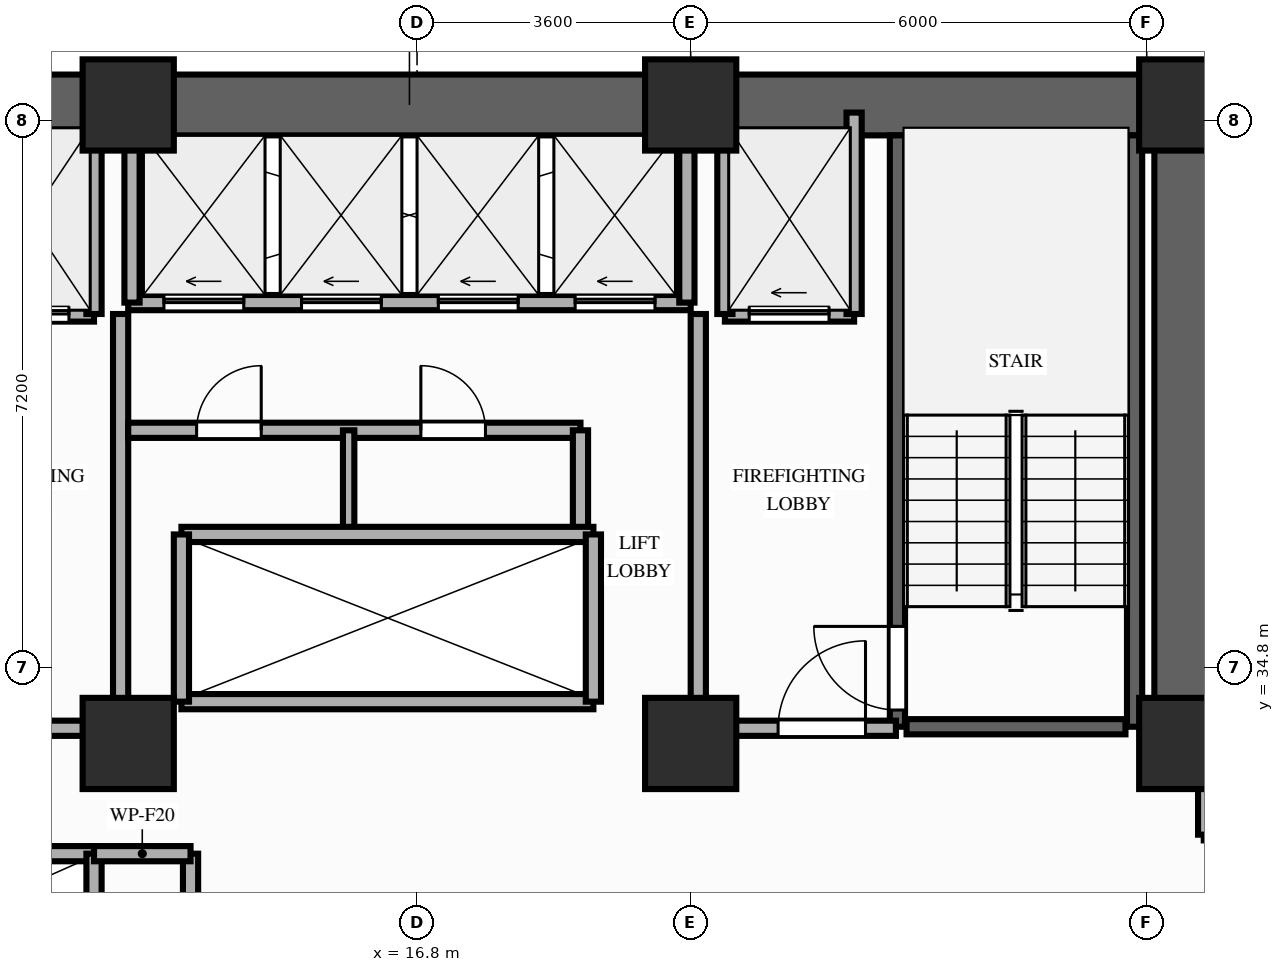
"""IFC4 building model, lengths in metres.
Left out: names, types, materials, properties, quantities, classifications, styles, units other than length and angle.
Written with IfcOpenShell. Run it as: python <this file> out.ifc"""

import sys

from ifc_helpers import new_model, si_unit, direction, frame, frame_2d, origin, origin_2d, place, context, subcontext, project, spatial, rectangle, extrude, element, fill, save


model = new_model("IFC4")
c1 = context("Model", 3, precision=1e-05, world=origin(), true_north=direction((0.0, 1.0)))
c2 = subcontext(c1, "Body", "Model", "MODEL_VIEW")
j1 = project(units=[si_unit("LENGTHUNIT", "METRE"), si_unit("PLANEANGLEUNIT", "RADIAN")], contexts=[c1])
p1 = place(None, origin())
s1 = spatial("IfcSite", under=j1, at=p1, CompositionType="ELEMENT")
p2 = place(p1, origin())
s2 = spatial("IfcBuilding", under=s1, at=p2, CompositionType="ELEMENT")
p3 = place(p2, frame((0.0, 0.0, 53.2)))
s3 = spatial("IfcBuildingStorey", under=s2, at=p3, CompositionType="ELEMENT", Elevation=53.2)
for number, where, z_axis, x_axis in (
    (1, (13.0, 33.8, 0.0), (0.0, 0.0, 1.0), (1.0, 0.0, 0.0)),
    (2, (20.4, 33.8, 0.0), (0.0, 0.0, 1.0), (1.0, 0.0, 0.0)),
    (3, (26.9, 33.8, 0.0), (0.0, 0.0, 1.0), (1.0, 0.0, 0.0)),
    (4, (13.0, 42.2, 0.0), (0.0, 0.0, 1.0), (1.0, 0.0, 0.0)),
    (5, (20.4, 42.2, 0.0), (0.0, 0.0, 1.0), (1.0, 0.0, 0.0)),
    (6, (26.9, 42.2, 0.0), (0.0, 0.0, 1.0), (1.0, 0.0, 0.0)),
):
    element("IfcColumn", number, at=place(p3, frame(where, z_axis=z_axis, x_axis=x_axis)), inside=s3, PredefinedType="COLUMN", context=c2, shape_type="SweptSolid", body=[
        extrude(rectangle(XDim=1.2, YDim=1.2, at=origin_2d()), origin(), (0.0, 0.0, 1.0), 3.2),
    ])
p4 = place(p3, frame((6.45, 42.2, 0.0), z_axis=(0.0, 0.0, 1.0), x_axis=(1.0, 0.0, 0.0)))
e7 = element("IfcWall", 7, at=p4, inside=s3, PredefinedType="SHEAR", context=c2, shape_type="SweptSolid", body=[
    extrude(rectangle(XDim=20.45, YDim=0.8, at=frame_2d((10.225, 0.0))), origin(), (0.0, 0.0, 1.0), 3.02),
])
p5 = place(p3, frame((26.9, 33.8, 0.0), z_axis=(0.0, 0.0, 1.0), x_axis=(0.0, 1.0, 0.0)))
e8 = element("IfcWall", 8, at=p5, inside=s3, PredefinedType="SHEAR", context=c2, shape_type="SweptSolid", body=[
    extrude(rectangle(XDim=7.95, YDim=0.8, at=frame_2d((3.975, 0.0))), origin(), (0.0, 0.0, 1.0), 3.02),
])
p6 = place(p3, frame((23.12, 34.02, 0.0), z_axis=(0.0, 0.0, 1.0), x_axis=(0.0, 1.0, 0.0)))
e9 = element("IfcWall", 9, at=p6, inside=s3, PredefinedType="SHEAR", context=c2, shape_type="SweptSolid", body=[
    extrude(rectangle(XDim=7.78, YDim=0.2, at=frame_2d((3.89, 0.0))), origin(), (0.0, 0.0, 1.0), 3.02),
])
p7 = place(p6, frame((0.22, 0.0, 0.0)))
e10 = element("IfcOpeningElement", 10, at=p7, cuts=e9, PredefinedType="OPENING", context=c2, shape_type="SweptSolid", body=[
    extrude(rectangle(XDim=1.1, YDim=2.15, at=frame_2d((0.55, 1.075))), frame((0.0, 0.11, 0.0), z_axis=(0.0, -1.0, 0.0), x_axis=(1.0, 0.0, 0.0)), (0.0, 0.0, 1.0), 0.22),
])
p8 = place(p3, frame((26.24, 34.02, 0.0), z_axis=(0.0, 0.0, 1.0), x_axis=(0.0, 1.0, 0.0)))
e11 = element("IfcWall", 11, at=p8, inside=s3, PredefinedType="SHEAR", context=c2, shape_type="SweptSolid", body=[
    extrude(rectangle(XDim=7.78, YDim=0.2, at=frame_2d((3.89, 0.0))), origin(), (0.0, 0.0, 1.0), 3.02),
])
p9 = place(p3, frame((23.24, 34.02, 0.0), z_axis=(0.0, 0.0, 1.0), x_axis=(1.0, 0.0, 0.0)))
e12 = element("IfcWall", 12, at=p9, inside=s3, PredefinedType="SHEAR", context=c2, shape_type="SweptSolid", body=[
    extrude(rectangle(XDim=2.88, YDim=0.2, at=frame_2d((1.44, 0.0))), origin(), (0.0, 0.0, 1.0), 3.02),
])
p10 = place(p3, frame((7.0, 32.35, 0.0), z_axis=(0.0, 0.0, 1.0), x_axis=(1.0, 0.0, 0.0)))
e13 = element("IfcWall", 13, at=p10, inside=s3, PredefinedType="MOVABLE", context=c2, shape_type="SweptSolid", body=[
    extrude(rectangle(XDim=5.55, YDim=0.2, at=frame_2d((2.775, 0.0))), origin(), (0.0, 0.0, 1.0), 3.02),
])
p11 = place(p3, frame((12.55, 29.85, 0.0), z_axis=(0.0, 0.0, 1.0), x_axis=(0.0, 1.0, 0.0)))
e14 = element("IfcWall", 14, at=p11, inside=s3, PredefinedType="MOVABLE", context=c2, shape_type="SweptSolid", body=[
    extrude(rectangle(XDim=2.5, YDim=0.2, at=frame_2d((1.25, 0.0))), origin(), (0.0, 0.0, 1.0), 3.02),
])
p12 = place(p3, frame((10.85, 39.45, 0.0), z_axis=(0.0, 0.0, 1.0), x_axis=(1.0, 0.0, 0.0)))
e15 = element("IfcWall", 15, at=p12, inside=s3, PredefinedType="MOVABLE", context=c2, shape_type="SweptSolid", body=[
    extrude(rectangle(XDim=1.7, YDim=0.2, at=frame_2d((0.85, 0.0))), origin(), (0.0, 0.0, 1.0), 3.02),
])
p13 = place(p12, frame((0.32, 0.0, 0.0)))
e16 = element("IfcOpeningElement", 16, at=p13, cuts=e15, PredefinedType="OPENING", context=c2, shape_type="SweptSolid", body=[
    extrude(rectangle(XDim=1.05, YDim=2.15, at=frame_2d((0.525, 1.075))), frame((0.0, 0.11, 0.0), z_axis=(0.0, -1.0, 0.0), x_axis=(1.0, 0.0, 0.0)), (0.0, 0.0, 1.0), 0.22),
])
p14 = place(p3, frame((20.85, 39.45, 0.0), z_axis=(0.0, 0.0, 1.0), x_axis=(1.0, 0.0, 0.0)))
e17 = element("IfcWall", 17, at=p14, inside=s3, PredefinedType="MOVABLE", context=c2, shape_type="SweptSolid", body=[
    extrude(rectangle(XDim=1.7, YDim=0.2, at=frame_2d((0.85, 0.0))), origin(), (0.0, 0.0, 1.0), 3.02),
])
p15 = place(p14, frame((0.32, 0.0, 0.0)))
e18 = element("IfcOpeningElement", 18, at=p15, cuts=e17, PredefinedType="OPENING", context=c2, shape_type="SweptSolid", body=[
    extrude(rectangle(XDim=1.05, YDim=2.15, at=frame_2d((0.525, 1.075))), frame((0.0, 0.11, 0.0), z_axis=(0.0, -1.0, 0.0), x_axis=(1.0, 0.0, 0.0)), (0.0, 0.0, 1.0), 0.22),
])
p16 = place(p3, frame((12.55, 39.45, 0.0), z_axis=(0.0, 0.0, 1.0), x_axis=(0.0, 1.0, 0.0)))
e19 = element("IfcWall", 19, at=p16, inside=s3, PredefinedType="MOVABLE", context=c2, shape_type="SweptSolid", body=[
    extrude(rectangle(XDim=2.65, YDim=0.2, at=frame_2d((1.325, 0.0))), origin(), (0.0, 0.0, 1.0), 2.41),
])
p17 = place(p3, frame((12.9, 34.0, 0.0), z_axis=(0.0, 0.0, 1.0), x_axis=(0.0, 1.0, 0.0)))
e20 = element("IfcWall", 20, at=p17, inside=s3, PredefinedType="PARTITIONING", context=c2, shape_type="SweptSolid", body=[
    extrude(rectangle(XDim=5.45, YDim=0.2, at=frame_2d((2.725, 0.0))), origin(), (0.0, 0.0, 1.0), 2.41),
])
p18 = place(p3, frame((10.24, 34.0, 0.0), z_axis=(0.0, 0.0, 1.0), x_axis=(1.0, 0.0, 0.0)))
e21 = element("IfcWall", 21, at=p18, inside=s3, PredefinedType="PARTITIONING", context=c2, shape_type="SweptSolid", body=[
    extrude(rectangle(XDim=2.66, YDim=0.2, at=frame_2d((1.33, 0.0))), origin(), (0.0, 0.0, 1.0), 2.41),
])
p19 = place(p18, frame((0.35, 0.0, 0.0)))
e22 = element("IfcOpeningElement", 22, at=p19, cuts=e21, PredefinedType="OPENING", context=c2, shape_type="SweptSolid", body=[
    extrude(rectangle(XDim=1.15, YDim=2.15, at=frame_2d((0.575, 1.075))), frame((0.0, 0.11, 0.0), z_axis=(0.0, -1.0, 0.0), x_axis=(1.0, 0.0, 0.0)), (0.0, 0.0, 1.0), 0.22),
])
for number, where, z_axis, x_axis in (
    (23, (20.85, 39.45, 0.0), (0.0, 0.0, 1.0), (0.0, 1.0, 0.0)),
    (24, (22.55, 39.45, 0.0), (0.0, 0.0, 1.0), (0.0, 1.0, 0.0)),
):
    element("IfcWall", number, at=place(p3, frame(where, z_axis=z_axis, x_axis=x_axis)), inside=s3, PredefinedType="MOVABLE", context=c2, shape_type="SweptSolid", body=[
        extrude(rectangle(XDim=2.65, YDim=0.2, at=frame_2d((1.325, 0.0))), origin(), (0.0, 0.0, 1.0), 2.41),
    ])
p20 = place(p3, frame((20.5, 34.0, 0.0), z_axis=(0.0, 0.0, 1.0), x_axis=(0.0, 1.0, 0.0)))
e25 = element("IfcWall", 25, at=p20, inside=s3, PredefinedType="PARTITIONING", context=c2, shape_type="SweptSolid", body=[
    extrude(rectangle(XDim=5.45, YDim=0.2, at=frame_2d((2.725, 0.0))), origin(), (0.0, 0.0, 1.0), 2.41),
])
p21 = place(p3, frame((20.5, 34.0, 0.0), z_axis=(0.0, 0.0, 1.0), x_axis=(1.0, 0.0, 0.0)))
e26 = element("IfcWall", 26, at=p21, inside=s3, PredefinedType="PARTITIONING", context=c2, shape_type="SweptSolid", body=[
    extrude(rectangle(XDim=2.6, YDim=0.2, at=frame_2d((1.3, 0.0))), origin(), (0.0, 0.0, 1.0), 2.41),
])
p22 = place(p21, frame((1.05, 0.0, 0.0)))
e27 = element("IfcOpeningElement", 27, at=p22, cuts=e26, PredefinedType="OPENING", context=c2, shape_type="SweptSolid", body=[
    extrude(rectangle(XDim=1.15, YDim=2.15, at=frame_2d((0.575, 1.075))), frame((0.0, 0.11, 0.0), z_axis=(0.0, -1.0, 0.0), x_axis=(1.0, 0.0, 0.0)), (0.0, 0.0, 1.0), 0.22),
])
p23 = place(p3, frame((13.82, 29.85, 0.0), z_axis=(0.0, 0.0, 1.0), x_axis=(0.0, 1.0, 0.0)))
e28 = element("IfcWall", 28, at=p23, inside=s3, PredefinedType="PARTITIONING", context=c2, shape_type="SweptSolid", body=[
    extrude(rectangle(XDim=2.5, YDim=0.2, at=frame_2d((1.25, 0.0))), origin(), (0.0, 0.0, 1.0), 3.02),
])
p24 = place(p3, frame((12.55, 32.35, 0.0), z_axis=(0.0, 0.0, 1.0), x_axis=(1.0, 0.0, 0.0)))
e29 = element("IfcWall", 29, at=p24, inside=s3, PredefinedType="PARTITIONING", context=c2, shape_type="SweptSolid", body=[
    extrude(rectangle(XDim=1.27, YDim=0.2, at=frame_2d((0.635, 0.0))), origin(), (0.0, 0.0, 1.0), 3.02),
])
p25 = place(p3, frame((13.0, 39.6, 0.0), z_axis=(0.0, 0.0, 1.0), x_axis=(1.0, 0.0, 0.0)))
e30 = element("IfcWall", 30, at=p25, inside=s3, PredefinedType="MOVABLE", context=c2, shape_type="SweptSolid", body=[
    extrude(rectangle(XDim=7.4, YDim=0.2, at=frame_2d((3.7, 0.0))), origin(), (0.0, 0.0, 1.0), 3.02),
])
p26 = place(p25, frame((0.47, 0.0, 0.0)))
e31 = element("IfcOpeningElement", 31, at=p26, cuts=e30, PredefinedType="OPENING", context=c2, shape_type="SweptSolid", body=[
    extrude(rectangle(XDim=1.05, YDim=2.15, at=frame_2d((0.525, 1.075))), frame((0.0, 0.11, 0.0), z_axis=(0.0, -1.0, 0.0), x_axis=(1.0, 0.0, 0.0)), (0.0, 0.0, 1.0), 0.22),
])
p27 = place(p25, frame((2.28, 0.0, 0.0)))
e32 = element("IfcOpeningElement", 32, at=p27, cuts=e30, PredefinedType="OPENING", context=c2, shape_type="SweptSolid", body=[
    extrude(rectangle(XDim=1.05, YDim=2.15, at=frame_2d((0.525, 1.075))), frame((0.0, 0.11, 0.0), z_axis=(0.0, -1.0, 0.0), x_axis=(1.0, 0.0, 0.0)), (0.0, 0.0, 1.0), 0.22),
])
p28 = place(p25, frame((4.08, 0.0, 0.0)))
e33 = element("IfcOpeningElement", 33, at=p28, cuts=e30, PredefinedType="OPENING", context=c2, shape_type="SweptSolid", body=[
    extrude(rectangle(XDim=1.05, YDim=2.15, at=frame_2d((0.525, 1.075))), frame((0.0, 0.11, 0.0), z_axis=(0.0, -1.0, 0.0), x_axis=(1.0, 0.0, 0.0)), (0.0, 0.0, 1.0), 0.22),
])
p29 = place(p25, frame((5.88, 0.0, 0.0)))
e34 = element("IfcOpeningElement", 34, at=p29, cuts=e30, PredefinedType="OPENING", context=c2, shape_type="SweptSolid", body=[
    extrude(rectangle(XDim=1.05, YDim=2.15, at=frame_2d((0.525, 1.075))), frame((0.0, 0.11, 0.0), z_axis=(0.0, -1.0, 0.0), x_axis=(1.0, 0.0, 0.0)), (0.0, 0.0, 1.0), 0.22),
])
for number, where, z_axis, x_axis in (
    (35, (13.05, 39.6, 0.0), (0.0, 0.0, 1.0), (0.0, 1.0, 0.0)),
    (36, (20.35, 39.6, 0.0), (0.0, 0.0, 1.0), (0.0, 1.0, 0.0)),
):
    element("IfcWall", number, at=place(p3, frame(where, z_axis=z_axis, x_axis=x_axis)), inside=s3, PredefinedType="MOVABLE", context=c2, shape_type="SweptSolid", body=[
        extrude(rectangle(XDim=2.18, YDim=0.2, at=frame_2d((1.09, 0.0))), origin(), (0.0, 0.0, 1.0), 3.02),
    ])
p30 = place(p3, frame((13.0, 37.92, 0.0), z_axis=(0.0, 0.0, 1.0), x_axis=(1.0, 0.0, 0.0)))
e37 = element("IfcWall", 37, at=p30, inside=s3, PredefinedType="PARTITIONING", context=c2, shape_type="SweptSolid", body=[
    extrude(rectangle(XDim=5.95, YDim=0.2, at=frame_2d((2.975, 0.0))), origin(), (0.0, 0.0, 1.0), 3.02),
])
p31 = place(p30, frame((0.9, 0.0, 0.0)))
e38 = element("IfcOpeningElement", 38, at=p31, cuts=e37, PredefinedType="OPENING", context=c2, shape_type="SweptSolid", body=[
    extrude(rectangle(XDim=0.85, YDim=2.05, at=frame_2d((0.425, 1.025))), frame((0.0, 0.11, 0.0), z_axis=(0.0, -1.0, 0.0), x_axis=(1.0, 0.0, 0.0)), (0.0, 0.0, 1.0), 0.22),
])
p32 = place(p30, frame((3.85, 0.0, 0.0)))
e39 = element("IfcOpeningElement", 39, at=p32, cuts=e37, PredefinedType="OPENING", context=c2, shape_type="SweptSolid", body=[
    extrude(rectangle(XDim=0.85, YDim=2.05, at=frame_2d((0.425, 1.025))), frame((0.0, 0.11, 0.0), z_axis=(0.0, -1.0, 0.0), x_axis=(1.0, 0.0, 0.0)), (0.0, 0.0, 1.0), 0.22),
])
p33 = place(p3, frame((18.95, 36.6, 0.0), z_axis=(0.0, 0.0, 1.0), x_axis=(0.0, 1.0, 0.0)))
e40 = element("IfcWall", 40, at=p33, inside=s3, PredefinedType="PARTITIONING", context=c2, shape_type="SweptSolid", body=[
    extrude(rectangle(XDim=1.32, YDim=0.2, at=frame_2d((0.66, 0.0))), origin(), (0.0, 0.0, 1.0), 3.02),
])
p34 = place(p3, frame((15.9, 36.6, 0.0), z_axis=(0.0, 0.0, 1.0), x_axis=(0.0, 1.0, 0.0)))
e41 = element("IfcWall", 41, at=p34, inside=s3, PredefinedType="PARTITIONING", context=c2, shape_type="SweptSolid", body=[
    extrude(rectangle(XDim=1.32, YDim=0.15, at=frame_2d((0.66, 0.0))), origin(), (0.0, 0.0, 1.0), 3.02),
])
for number, where, z_axis, x_axis in (
    (42, (13.7, 34.35, 0.0), (0.0, 0.0, 1.0), (1.0, 0.0, 0.0)),
    (43, (13.7, 36.55, 0.0), (0.0, 0.0, 1.0), (1.0, 0.0, 0.0)),
):
    element("IfcWall", number, at=place(p3, frame(where, z_axis=z_axis, x_axis=x_axis)), inside=s3, PredefinedType="MOVABLE", context=c2, shape_type="SweptSolid", body=[
        extrude(rectangle(XDim=5.42, YDim=0.2, at=frame_2d((2.71, 0.0))), origin(), (0.0, 0.0, 1.0), 3.02),
    ])
for number, where, z_axis, x_axis in (
    (44, (13.7, 34.35, 0.0), (0.0, 0.0, 1.0), (0.0, 1.0, 0.0)),
    (45, (19.12, 34.35, 0.0), (0.0, 0.0, 1.0), (0.0, 1.0, 0.0)),
):
    element("IfcWall", number, at=place(p3, frame(where, z_axis=z_axis, x_axis=x_axis)), inside=s3, PredefinedType="MOVABLE", context=c2, shape_type="SweptSolid", body=[
        extrude(rectangle(XDim=2.2, YDim=0.2, at=frame_2d((1.1, 0.0))), origin(), (0.0, 0.0, 1.0), 3.02),
    ])
p35 = place(p3, frame((27.15, 32.6, 0.0), z_axis=(0.0, 0.0, 1.0), x_axis=(1.0, 0.0, 0.0)))
e46 = element("IfcWall", 46, at=p35, inside=s3, PredefinedType="PARTITIONING", context=c2, shape_type="SweptSolid", body=[
    extrude(rectangle(XDim=11.15, YDim=0.15, at=frame_2d((5.575, 0.0))), origin(), (0.0, 0.0, 1.0), 2.41),
])
p36 = place(p35, frame((1.59, 0.0, 0.0)))
e47 = element("IfcOpeningElement", 47, at=p36, cuts=e46, PredefinedType="OPENING", context=c2, shape_type="SweptSolid", body=[
    extrude(rectangle(XDim=0.95, YDim=2.15, at=frame_2d((0.475, 1.075))), frame((0.0, 0.085, 0.0), z_axis=(0.0, -1.0, 0.0), x_axis=(1.0, 0.0, 0.0)), (0.0, 0.0, 1.0), 0.17),
])
p37 = place(p35, frame((7.16, 0.0, 0.0)))
e48 = element("IfcOpeningElement", 48, at=p37, cuts=e46, PredefinedType="OPENING", context=c2, shape_type="SweptSolid", body=[
    extrude(rectangle(XDim=0.95, YDim=2.15, at=frame_2d((0.475, 1.075))), frame((0.0, 0.085, 0.0), z_axis=(0.0, -1.0, 0.0), x_axis=(1.0, 0.0, 0.0)), (0.0, 0.0, 1.0), 0.17),
])
p38 = place(p3, frame((27.15, 32.6, 0.0), z_axis=(0.0, 0.0, 1.0), x_axis=(0.0, 1.0, 0.0)))
e49 = element("IfcWall", 49, at=p38, inside=s3, PredefinedType="PARTITIONING", context=c2, shape_type="SweptSolid", body=[
    extrude(rectangle(XDim=1.08, YDim=0.15, at=frame_2d((0.54, 0.0))), origin(), (0.0, 0.0, 1.0), 2.41),
])
p39 = place(p7, origin())
e50 = element("IfcDoor", 50, at=p39, inside=s3, OperationType="SINGLE_SWING_RIGHT", PredefinedType="DOOR", context=c2, shape_type="SweptSolid", body=[
    extrude(rectangle(XDim=1.1, YDim=2.15, at=frame_2d((0.55, 1.075))), frame((0.0, 0.025, 0.0), z_axis=(0.0, -1.0, 0.0), x_axis=(1.0, 0.0, 0.0)), (0.0, 0.0, 1.0), 0.05),
])
fill(e10, e50)
p40 = place(p13, origin())
e51 = element("IfcDoor", 51, at=p40, inside=s3, OperationType="SLIDING_TO_LEFT", PredefinedType="DOOR", context=c2, shape_type="SweptSolid", body=[
    extrude(rectangle(XDim=1.05, YDim=2.15, at=frame_2d((0.525, 1.075))), frame((0.0, 0.025, 0.0), z_axis=(0.0, -1.0, 0.0), x_axis=(1.0, 0.0, 0.0)), (0.0, 0.0, 1.0), 0.05),
])
fill(e16, e51)
p41 = place(p15, origin())
e52 = element("IfcDoor", 52, at=p41, inside=s3, OperationType="SLIDING_TO_LEFT", PredefinedType="DOOR", context=c2, shape_type="SweptSolid", body=[
    extrude(rectangle(XDim=1.05, YDim=2.15, at=frame_2d((0.525, 1.075))), frame((0.0, 0.025, 0.0), z_axis=(0.0, -1.0, 0.0), x_axis=(1.0, 0.0, 0.0)), (0.0, 0.0, 1.0), 0.05),
])
fill(e18, e52)
p42 = place(p22, origin())
e53 = element("IfcDoor", 53, at=p42, inside=s3, OperationType="SINGLE_SWING_RIGHT", PredefinedType="DOOR", context=c2, shape_type="SweptSolid", body=[
    extrude(rectangle(XDim=1.15, YDim=2.15, at=frame_2d((0.575, 1.075))), frame((0.0, 0.025, 0.0), z_axis=(0.0, -1.0, 0.0), x_axis=(1.0, 0.0, 0.0)), (0.0, 0.0, 1.0), 0.05),
])
fill(e27, e53)
p43 = place(p26, origin())
e54 = element("IfcDoor", 54, at=p43, inside=s3, OperationType="SLIDING_TO_LEFT", PredefinedType="DOOR", context=c2, shape_type="SweptSolid", body=[
    extrude(rectangle(XDim=1.05, YDim=2.15, at=frame_2d((0.525, 1.075))), frame((0.0, 0.025, 0.0), z_axis=(0.0, -1.0, 0.0), x_axis=(1.0, 0.0, 0.0)), (0.0, 0.0, 1.0), 0.05),
])
fill(e31, e54)
p44 = place(p27, origin())
e55 = element("IfcDoor", 55, at=p44, inside=s3, OperationType="SLIDING_TO_LEFT", PredefinedType="DOOR", context=c2, shape_type="SweptSolid", body=[
    extrude(rectangle(XDim=1.05, YDim=2.15, at=frame_2d((0.525, 1.075))), frame((0.0, 0.025, 0.0), z_axis=(0.0, -1.0, 0.0), x_axis=(1.0, 0.0, 0.0)), (0.0, 0.0, 1.0), 0.05),
])
fill(e32, e55)
p45 = place(p28, origin())
e56 = element("IfcDoor", 56, at=p45, inside=s3, OperationType="SLIDING_TO_LEFT", PredefinedType="DOOR", context=c2, shape_type="SweptSolid", body=[
    extrude(rectangle(XDim=1.05, YDim=2.15, at=frame_2d((0.525, 1.075))), frame((0.0, 0.025, 0.0), z_axis=(0.0, -1.0, 0.0), x_axis=(1.0, 0.0, 0.0)), (0.0, 0.0, 1.0), 0.05),
])
fill(e33, e56)
p46 = place(p29, origin())
e57 = element("IfcDoor", 57, at=p46, inside=s3, OperationType="SLIDING_TO_LEFT", PredefinedType="DOOR", context=c2, shape_type="SweptSolid", body=[
    extrude(rectangle(XDim=1.05, YDim=2.15, at=frame_2d((0.525, 1.075))), frame((0.0, 0.025, 0.0), z_axis=(0.0, -1.0, 0.0), x_axis=(1.0, 0.0, 0.0)), (0.0, 0.0, 1.0), 0.05),
])
fill(e34, e57)
p47 = place(p31, origin())
e58 = element("IfcDoor", 58, at=p47, inside=s3, OperationType="SINGLE_SWING_RIGHT", PredefinedType="DOOR", context=c2, shape_type="SweptSolid", body=[
    extrude(rectangle(XDim=0.85, YDim=2.05, at=frame_2d((0.425, 1.025))), frame((0.0, 0.025, 0.0), z_axis=(0.0, -1.0, 0.0), x_axis=(1.0, 0.0, 0.0)), (0.0, 0.0, 1.0), 0.05),
])
fill(e38, e58)
p48 = place(p32, origin())
e59 = element("IfcDoor", 59, at=p48, inside=s3, OperationType="SINGLE_SWING_LEFT", PredefinedType="DOOR", context=c2, shape_type="SweptSolid", body=[
    extrude(rectangle(XDim=0.85, YDim=2.05, at=frame_2d((0.425, 1.025))), frame((0.0, 0.025, 0.0), z_axis=(0.0, -1.0, 0.0), x_axis=(1.0, 0.0, 0.0)), (0.0, 0.0, 1.0), 0.05),
])
fill(e39, e59)
save(model, sys.argv[1])
